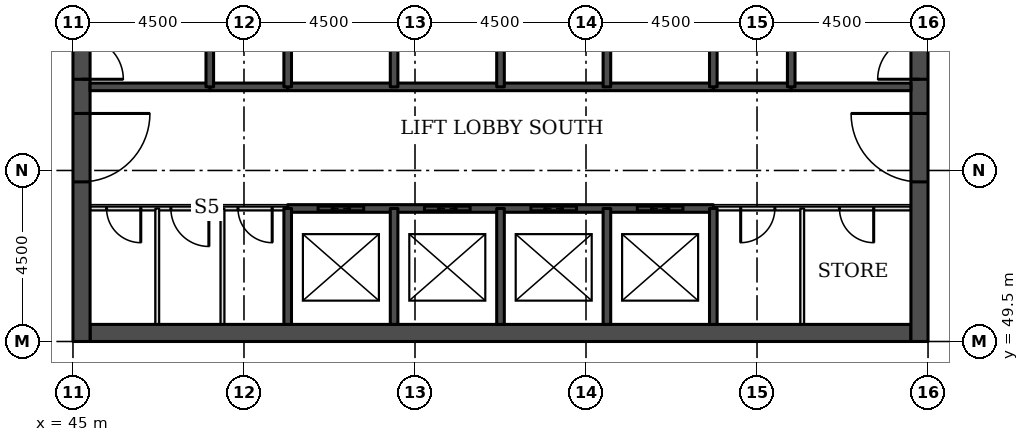
"""IFC4 building model, lengths in metres.
Left out: names, types, materials, properties, quantities, classifications, styles, units other than length and angle.
Written with IfcOpenShell. Run it as: python <this file> out.ifc"""

import sys

from ifc_helpers import new_model, si_unit, direction, frame, frame_2d, origin, place, context, subcontext, project, spatial, rectangle, extrude, element, fill, save


model = new_model("IFC4")
c1 = context("Model", 3, precision=1e-05, world=origin(), true_north=direction((0.0, 1.0)))
c2 = subcontext(c1, "Body", "Model", "MODEL_VIEW")
j1 = project(units=[si_unit("LENGTHUNIT", "METRE"), si_unit("PLANEANGLEUNIT", "RADIAN")], contexts=[c1])
p1 = place(None, origin())
s1 = spatial("IfcSite", under=j1, at=p1, CompositionType="ELEMENT")
p2 = place(p1, origin())
s2 = spatial("IfcBuilding", under=s1, at=p2, CompositionType="ELEMENT")
p3 = place(p2, frame((0.0, 0.0, 119.6)))
s3 = spatial("IfcBuildingStorey", under=s2, at=p3, CompositionType="ELEMENT", Elevation=119.6)
p4 = place(p3, frame((45.45, 49.725, 0.0), z_axis=(0.0, 0.0, 1.0), x_axis=(1.0, 0.0, 0.0)))
e1 = element("IfcWall", 1, at=p4, inside=s3, PredefinedType="SHEAR", context=c2, shape_type="SweptSolid", body=[
    extrude(rectangle(XDim=21.6, YDim=0.45, at=frame_2d((10.8, 0.0))), origin(), (0.0, 0.0, 1.0), 3.7),
])
p5 = place(p3, frame((45.225, 49.5, 0.0), z_axis=(0.0, 0.0, 1.0), x_axis=(0.0, 1.0, 0.0)))
e2 = element("IfcWall", 2, at=p5, inside=s3, PredefinedType="SHEAR", context=c2, shape_type="SweptSolid", body=[
    extrude(rectangle(XDim=22.5, YDim=0.45, at=frame_2d((11.25, 0.0))), origin(), (0.0, 0.0, 1.0), 3.7),
])
p6 = place(p5, frame((4.2, 0.0, 0.0)))
e3 = element("IfcOpeningElement", 3, at=p6, cuts=e2, PredefinedType="OPENING", context=c2, shape_type="SweptSolid", body=[
    extrude(rectangle(XDim=1.8, YDim=2.1, at=frame_2d((0.9, 1.05))), frame((0.0, 0.235, 0.0), z_axis=(0.0, -1.0, 0.0), x_axis=(1.0, 0.0, 0.0)), (0.0, 0.0, 1.0), 0.47),
])
p7 = place(p5, frame((6.9, 0.0, 0.0)))
e4 = element("IfcOpeningElement", 4, at=p7, cuts=e2, PredefinedType="OPENING", context=c2, shape_type="SweptSolid", body=[
    extrude(rectangle(XDim=1.1, YDim=2.1, at=frame_2d((0.55, 1.05))), frame((0.0, 0.235, 0.0), z_axis=(0.0, -1.0, 0.0), x_axis=(1.0, 0.0, 0.0)), (0.0, 0.0, 1.0), 0.47),
])
p8 = place(p5, frame((13.6, 0.0, 0.0)))
e5 = element("IfcOpeningElement", 5, at=p8, cuts=e2, PredefinedType="OPENING", context=c2, shape_type="SweptSolid", body=[
    extrude(rectangle(XDim=1.1, YDim=2.1, at=frame_2d((0.55, 1.05))), frame((0.0, 0.235, 0.0), z_axis=(0.0, -1.0, 0.0), x_axis=(1.0, 0.0, 0.0)), (0.0, 0.0, 1.0), 0.47),
])
p9 = place(p5, frame((16.5, 0.0, 0.0)))
e6 = element("IfcOpeningElement", 6, at=p9, cuts=e2, PredefinedType="OPENING", context=c2, shape_type="SweptSolid", body=[
    extrude(rectangle(XDim=1.8, YDim=2.1, at=frame_2d((0.9, 1.05))), frame((0.0, 0.235, 0.0), z_axis=(0.0, -1.0, 0.0), x_axis=(1.0, 0.0, 0.0)), (0.0, 0.0, 1.0), 0.47),
])
p10 = place(p3, frame((67.275, 49.5, 0.0), z_axis=(0.0, 0.0, 1.0), x_axis=(0.0, 1.0, 0.0)))
e7 = element("IfcWall", 7, at=p10, inside=s3, PredefinedType="SHEAR", context=c2, shape_type="SweptSolid", body=[
    extrude(rectangle(XDim=22.5, YDim=0.45, at=frame_2d((11.25, 0.0))), origin(), (0.0, 0.0, 1.0), 3.7),
])
p11 = place(p10, frame((4.2, 0.0, 0.0)))
e8 = element("IfcOpeningElement", 8, at=p11, cuts=e7, PredefinedType="OPENING", context=c2, shape_type="SweptSolid", body=[
    extrude(rectangle(XDim=1.8, YDim=2.1, at=frame_2d((0.9, 1.05))), frame((0.0, 0.235, 0.0), z_axis=(0.0, -1.0, 0.0), x_axis=(1.0, 0.0, 0.0)), (0.0, 0.0, 1.0), 0.47),
])
p12 = place(p10, frame((6.9, 0.0, 0.0)))
e9 = element("IfcOpeningElement", 9, at=p12, cuts=e7, PredefinedType="OPENING", context=c2, shape_type="SweptSolid", body=[
    extrude(rectangle(XDim=1.1, YDim=2.1, at=frame_2d((0.55, 1.05))), frame((0.0, 0.235, 0.0), z_axis=(0.0, -1.0, 0.0), x_axis=(1.0, 0.0, 0.0)), (0.0, 0.0, 1.0), 0.47),
])
p13 = place(p10, frame((13.6, 0.0, 0.0)))
e10 = element("IfcOpeningElement", 10, at=p13, cuts=e7, PredefinedType="OPENING", context=c2, shape_type="SweptSolid", body=[
    extrude(rectangle(XDim=1.1, YDim=2.1, at=frame_2d((0.55, 1.05))), frame((0.0, 0.235, 0.0), z_axis=(0.0, -1.0, 0.0), x_axis=(1.0, 0.0, 0.0)), (0.0, 0.0, 1.0), 0.47),
])
p14 = place(p10, frame((16.5, 0.0, 0.0)))
e11 = element("IfcOpeningElement", 11, at=p14, cuts=e7, PredefinedType="OPENING", context=c2, shape_type="SweptSolid", body=[
    extrude(rectangle(XDim=1.8, YDim=2.1, at=frame_2d((0.9, 1.05))), frame((0.0, 0.235, 0.0), z_axis=(0.0, -1.0, 0.0), x_axis=(1.0, 0.0, 0.0)), (0.0, 0.0, 1.0), 0.47),
])
p15 = place(p3, frame((45.45, 53.0, 0.0), z_axis=(0.0, 0.0, 1.0), x_axis=(1.0, 0.0, 0.0)))
e12 = element("IfcWall", 12, at=p15, inside=s3, PredefinedType="PARTITIONING", context=c2, shape_type="SweptSolid", body=[
    extrude(rectangle(XDim=5.2, YDim=0.1, at=frame_2d((2.6, 0.0))), origin(), (0.0, 0.0, 1.0), 3.55),
])
p16 = place(p15, frame((0.434, 0.0, 0.0)))
e13 = element("IfcOpeningElement", 13, at=p16, cuts=e12, PredefinedType="OPENING", context=c2, shape_type="SweptSolid", body=[
    extrude(rectangle(XDim=0.9, YDim=2.1, at=frame_2d((0.45, 1.05))), frame((0.0, 0.06, 0.0), z_axis=(0.0, -1.0, 0.0), x_axis=(1.0, 0.0, 0.0)), (0.0, 0.0, 1.0), 0.12),
])
p17 = place(p15, frame((2.126, 0.0, 0.0)))
e14 = element("IfcOpeningElement", 14, at=p17, cuts=e12, PredefinedType="OPENING", context=c2, shape_type="SweptSolid", body=[
    extrude(rectangle(XDim=1.0, YDim=2.1, at=frame_2d((0.5, 1.05))), frame((0.0, 0.06, 0.0), z_axis=(0.0, -1.0, 0.0), x_axis=(1.0, 0.0, 0.0)), (0.0, 0.0, 1.0), 0.12),
])
p18 = place(p15, frame((3.892, 0.0, 0.0)))
e15 = element("IfcOpeningElement", 15, at=p18, cuts=e12, PredefinedType="OPENING", context=c2, shape_type="SweptSolid", body=[
    extrude(rectangle(XDim=0.9, YDim=2.1, at=frame_2d((0.45, 1.05))), frame((0.0, 0.06, 0.0), z_axis=(0.0, -1.0, 0.0), x_axis=(1.0, 0.0, 0.0)), (0.0, 0.0, 1.0), 0.12),
])
p19 = place(p3, frame((61.85, 53.0, 0.0), z_axis=(0.0, 0.0, 1.0), x_axis=(1.0, 0.0, 0.0)))
e16 = element("IfcWall", 16, at=p19, inside=s3, PredefinedType="PARTITIONING", context=c2, shape_type="SweptSolid", body=[
    extrude(rectangle(XDim=5.2, YDim=0.1, at=frame_2d((2.6, 0.0))), origin(), (0.0, 0.0, 1.0), 3.55),
])
p20 = place(p19, frame((3.32, 0.0, 0.0)))
e17 = element("IfcOpeningElement", 17, at=p20, cuts=e16, PredefinedType="OPENING", context=c2, shape_type="SweptSolid", body=[
    extrude(rectangle(XDim=0.9, YDim=2.1, at=frame_2d((0.45, 1.05))), frame((0.0, 0.06, 0.0), z_axis=(0.0, -1.0, 0.0), x_axis=(1.0, 0.0, 0.0)), (0.0, 0.0, 1.0), 0.12),
])
p21 = place(p19, frame((0.72, 0.0, 0.0)))
e18 = element("IfcOpeningElement", 18, at=p21, cuts=e16, PredefinedType="OPENING", context=c2, shape_type="SweptSolid", body=[
    extrude(rectangle(XDim=0.9, YDim=2.1, at=frame_2d((0.45, 1.05))), frame((0.0, 0.06, 0.0), z_axis=(0.0, -1.0, 0.0), x_axis=(1.0, 0.0, 0.0)), (0.0, 0.0, 1.0), 0.12),
])
p22 = place(p3, frame((50.65, 53.0, 0.0), z_axis=(0.0, 0.0, 1.0), x_axis=(1.0, 0.0, 0.0)))
e19 = element("IfcWall", 19, at=p22, inside=s3, PredefinedType="SOLIDWALL", context=c2, shape_type="SweptSolid", body=[
    extrude(rectangle(XDim=11.2, YDim=0.2, at=frame_2d((5.6, 0.0))), origin(), (0.0, 0.0, 1.0), 3.55),
])
p23 = place(p22, frame((0.8, 0.0, 0.0)))
e20 = element("IfcOpeningElement", 20, at=p23, cuts=e19, PredefinedType="OPENING", context=c2, shape_type="SweptSolid", body=[
    extrude(rectangle(XDim=1.2, YDim=2.1, at=frame_2d((0.6, 1.05))), frame((0.0, 0.11, 0.0), z_axis=(0.0, -1.0, 0.0), x_axis=(1.0, 0.0, 0.0)), (0.0, 0.0, 1.0), 0.22),
])
p24 = place(p22, frame((3.6, 0.0, 0.0)))
e21 = element("IfcOpeningElement", 21, at=p24, cuts=e19, PredefinedType="OPENING", context=c2, shape_type="SweptSolid", body=[
    extrude(rectangle(XDim=1.2, YDim=2.1, at=frame_2d((0.6, 1.05))), frame((0.0, 0.11, 0.0), z_axis=(0.0, -1.0, 0.0), x_axis=(1.0, 0.0, 0.0)), (0.0, 0.0, 1.0), 0.22),
])
p25 = place(p22, frame((6.4, 0.0, 0.0)))
e22 = element("IfcOpeningElement", 22, at=p25, cuts=e19, PredefinedType="OPENING", context=c2, shape_type="SweptSolid", body=[
    extrude(rectangle(XDim=1.2, YDim=2.1, at=frame_2d((0.6, 1.05))), frame((0.0, 0.11, 0.0), z_axis=(0.0, -1.0, 0.0), x_axis=(1.0, 0.0, 0.0)), (0.0, 0.0, 1.0), 0.22),
])
p26 = place(p22, frame((9.2, 0.0, 0.0)))
e23 = element("IfcOpeningElement", 23, at=p26, cuts=e19, PredefinedType="OPENING", context=c2, shape_type="SweptSolid", body=[
    extrude(rectangle(XDim=1.2, YDim=2.1, at=frame_2d((0.6, 1.05))), frame((0.0, 0.11, 0.0), z_axis=(0.0, -1.0, 0.0), x_axis=(1.0, 0.0, 0.0)), (0.0, 0.0, 1.0), 0.22),
])
for number, where, z_axis, x_axis in (
    (24, (48.6, 56.2, 0.0), (0.0, 0.0, 1.0), (1.0, 0.0, 0.0)),
    (25, (61.85, 56.2, 0.0), (0.0, 0.0, 1.0), (1.0, 0.0, 0.0)),
):
    element("IfcWall", number, at=place(p3, frame(where, z_axis=z_axis, x_axis=x_axis)), inside=s3, PredefinedType="SOLIDWALL", context=c2, shape_type="SweptSolid", body=[
        extrude(rectangle(XDim=2.05, YDim=0.2, at=frame_2d((1.025, 0.0))), origin(), (0.0, 0.0, 1.0), 3.55),
    ])
p27 = place(p3, frame((45.45, 56.2, 0.0), z_axis=(0.0, 0.0, 1.0), x_axis=(1.0, 0.0, 0.0)))
e26 = element("IfcWall", 26, at=p27, inside=s3, PredefinedType="SOLIDWALL", context=c2, shape_type="SweptSolid", body=[
    extrude(rectangle(XDim=3.15, YDim=0.2, at=frame_2d((1.575, 0.0))), origin(), (0.0, 0.0, 1.0), 3.55),
])
p28 = place(p3, frame((50.65, 56.2, 0.0), z_axis=(0.0, 0.0, 1.0), x_axis=(1.0, 0.0, 0.0)))
e27 = element("IfcWall", 27, at=p28, inside=s3, PredefinedType="SOLIDWALL", context=c2, shape_type="SweptSolid", body=[
    extrude(rectangle(XDim=11.2, YDim=0.2, at=frame_2d((5.6, 0.0))), origin(), (0.0, 0.0, 1.0), 3.55),
])
p29 = place(p3, frame((63.9, 56.2, 0.0), z_axis=(0.0, 0.0, 1.0), x_axis=(1.0, 0.0, 0.0)))
e28 = element("IfcWall", 28, at=p29, inside=s3, PredefinedType="SOLIDWALL", context=c2, shape_type="SweptSolid", body=[
    extrude(rectangle(XDim=3.15, YDim=0.2, at=frame_2d((1.575, 0.0))), origin(), (0.0, 0.0, 1.0), 3.55),
])
p30 = place(p3, frame((47.218, 49.95, 0.0), z_axis=(0.0, 0.0, 1.0), x_axis=(0.0, 1.0, 0.0)))
e29 = element("IfcWall", 29, at=p30, inside=s3, PredefinedType="PARTITIONING", context=c2, shape_type="SweptSolid", body=[
    extrude(rectangle(XDim=3.05, YDim=0.1, at=frame_2d((1.525, 0.0))), origin(), (0.0, 0.0, 1.0), 3.55),
])
p31 = place(p3, frame((48.6, 56.2, 0.0), z_axis=(0.0, 0.0, 1.0), x_axis=(0.0, 1.0, 0.0)))
e30 = element("IfcWall", 30, at=p31, inside=s3, PredefinedType="SOLIDWALL", context=c2, shape_type="SweptSolid", body=[
    extrude(rectangle(XDim=5.8, YDim=0.2, at=frame_2d((2.9, 0.0))), origin(), (0.0, 0.0, 1.0), 3.55),
])
p32 = place(p3, frame((48.934, 49.95, 0.0), z_axis=(0.0, 0.0, 1.0), x_axis=(0.0, 1.0, 0.0)))
e31 = element("IfcWall", 31, at=p32, inside=s3, PredefinedType="PARTITIONING", context=c2, shape_type="SweptSolid", body=[
    extrude(rectangle(XDim=3.05, YDim=0.1, at=frame_2d((1.525, 0.0))), origin(), (0.0, 0.0, 1.0), 3.55),
])
p33 = place(p3, frame((50.65, 49.95, 0.0), z_axis=(0.0, 0.0, 1.0), x_axis=(0.0, 1.0, 0.0)))
e32 = element("IfcWall", 32, at=p33, inside=s3, PredefinedType="SOLIDWALL", context=c2, shape_type="SweptSolid", body=[
    extrude(rectangle(XDim=3.05, YDim=0.2, at=frame_2d((1.525, 0.0))), origin(), (0.0, 0.0, 1.0), 3.55),
])
p34 = place(p3, frame((50.65, 56.2, 0.0), z_axis=(0.0, 0.0, 1.0), x_axis=(0.0, 1.0, 0.0)))
e33 = element("IfcWall", 33, at=p34, inside=s3, PredefinedType="SOLIDWALL", context=c2, shape_type="SweptSolid", body=[
    extrude(rectangle(XDim=2.8, YDim=0.2, at=frame_2d((1.4, 0.0))), origin(), (0.0, 0.0, 1.0), 3.55),
])
p35 = place(p3, frame((53.45, 49.95, 0.0), z_axis=(0.0, 0.0, 1.0), x_axis=(0.0, 1.0, 0.0)))
e34 = element("IfcWall", 34, at=p35, inside=s3, PredefinedType="SOLIDWALL", context=c2, shape_type="SweptSolid", body=[
    extrude(rectangle(XDim=3.05, YDim=0.2, at=frame_2d((1.525, 0.0))), origin(), (0.0, 0.0, 1.0), 3.55),
])
p36 = place(p3, frame((53.45, 56.2, 0.0), z_axis=(0.0, 0.0, 1.0), x_axis=(0.0, 1.0, 0.0)))
e35 = element("IfcWall", 35, at=p36, inside=s3, PredefinedType="SOLIDWALL", context=c2, shape_type="SweptSolid", body=[
    extrude(rectangle(XDim=2.8, YDim=0.2, at=frame_2d((1.4, 0.0))), origin(), (0.0, 0.0, 1.0), 3.55),
])
p37 = place(p3, frame((56.25, 49.95, 0.0), z_axis=(0.0, 0.0, 1.0), x_axis=(0.0, 1.0, 0.0)))
e36 = element("IfcWall", 36, at=p37, inside=s3, PredefinedType="SOLIDWALL", context=c2, shape_type="SweptSolid", body=[
    extrude(rectangle(XDim=3.05, YDim=0.2, at=frame_2d((1.525, 0.0))), origin(), (0.0, 0.0, 1.0), 3.55),
])
p38 = place(p3, frame((56.25, 56.2, 0.0), z_axis=(0.0, 0.0, 1.0), x_axis=(0.0, 1.0, 0.0)))
e37 = element("IfcWall", 37, at=p38, inside=s3, PredefinedType="SOLIDWALL", context=c2, shape_type="SweptSolid", body=[
    extrude(rectangle(XDim=2.8, YDim=0.2, at=frame_2d((1.4, 0.0))), origin(), (0.0, 0.0, 1.0), 3.55),
])
p39 = place(p3, frame((59.05, 49.95, 0.0), z_axis=(0.0, 0.0, 1.0), x_axis=(0.0, 1.0, 0.0)))
e38 = element("IfcWall", 38, at=p39, inside=s3, PredefinedType="SOLIDWALL", context=c2, shape_type="SweptSolid", body=[
    extrude(rectangle(XDim=3.05, YDim=0.2, at=frame_2d((1.525, 0.0))), origin(), (0.0, 0.0, 1.0), 3.55),
])
p40 = place(p3, frame((59.05, 56.2, 0.0), z_axis=(0.0, 0.0, 1.0), x_axis=(0.0, 1.0, 0.0)))
e39 = element("IfcWall", 39, at=p40, inside=s3, PredefinedType="SOLIDWALL", context=c2, shape_type="SweptSolid", body=[
    extrude(rectangle(XDim=2.8, YDim=0.2, at=frame_2d((1.4, 0.0))), origin(), (0.0, 0.0, 1.0), 3.55),
])
p41 = place(p3, frame((61.85, 49.95, 0.0), z_axis=(0.0, 0.0, 1.0), x_axis=(0.0, 1.0, 0.0)))
e40 = element("IfcWall", 40, at=p41, inside=s3, PredefinedType="SOLIDWALL", context=c2, shape_type="SweptSolid", body=[
    extrude(rectangle(XDim=3.05, YDim=0.2, at=frame_2d((1.525, 0.0))), origin(), (0.0, 0.0, 1.0), 3.55),
])
p42 = place(p3, frame((61.85, 56.2, 0.0), z_axis=(0.0, 0.0, 1.0), x_axis=(0.0, 1.0, 0.0)))
e41 = element("IfcWall", 41, at=p42, inside=s3, PredefinedType="SOLIDWALL", context=c2, shape_type="SweptSolid", body=[
    extrude(rectangle(XDim=2.8, YDim=0.2, at=frame_2d((1.4, 0.0))), origin(), (0.0, 0.0, 1.0), 3.55),
])
p43 = place(p3, frame((63.9, 56.2, 0.0), z_axis=(0.0, 0.0, 1.0), x_axis=(0.0, 1.0, 0.0)))
e42 = element("IfcWall", 42, at=p43, inside=s3, PredefinedType="SOLIDWALL", context=c2, shape_type="SweptSolid", body=[
    extrude(rectangle(XDim=5.8, YDim=0.2, at=frame_2d((2.9, 0.0))), origin(), (0.0, 0.0, 1.0), 3.55),
])
p44 = place(p3, frame((64.19, 49.95, 0.0), z_axis=(0.0, 0.0, 1.0), x_axis=(0.0, 1.0, 0.0)))
e43 = element("IfcWall", 43, at=p44, inside=s3, PredefinedType="PARTITIONING", context=c2, shape_type="SweptSolid", body=[
    extrude(rectangle(XDim=3.05, YDim=0.1, at=frame_2d((1.525, 0.0))), origin(), (0.0, 0.0, 1.0), 3.55),
])
p45 = place(p23, origin())
e44 = element("IfcDoor", 44, at=p45, inside=s3, OperationType="DOUBLE_DOOR_SLIDING", PredefinedType="DOOR", context=c2, shape_type="SweptSolid", body=[
    extrude(rectangle(XDim=1.2, YDim=2.1, at=frame_2d((0.6, 1.05))), frame((0.0, 0.025, 0.0), z_axis=(0.0, -1.0, 0.0), x_axis=(1.0, 0.0, 0.0)), (0.0, 0.0, 1.0), 0.05),
])
fill(e20, e44)
p46 = place(p24, origin())
e45 = element("IfcDoor", 45, at=p46, inside=s3, OperationType="DOUBLE_DOOR_SLIDING", PredefinedType="DOOR", context=c2, shape_type="SweptSolid", body=[
    extrude(rectangle(XDim=1.2, YDim=2.1, at=frame_2d((0.6, 1.05))), frame((0.0, 0.025, 0.0), z_axis=(0.0, -1.0, 0.0), x_axis=(1.0, 0.0, 0.0)), (0.0, 0.0, 1.0), 0.05),
])
fill(e21, e45)
p47 = place(p25, origin())
e46 = element("IfcDoor", 46, at=p47, inside=s3, OperationType="DOUBLE_DOOR_SLIDING", PredefinedType="DOOR", context=c2, shape_type="SweptSolid", body=[
    extrude(rectangle(XDim=1.2, YDim=2.1, at=frame_2d((0.6, 1.05))), frame((0.0, 0.025, 0.0), z_axis=(0.0, -1.0, 0.0), x_axis=(1.0, 0.0, 0.0)), (0.0, 0.0, 1.0), 0.05),
])
fill(e22, e46)
p48 = place(p26, origin())
e47 = element("IfcDoor", 47, at=p48, inside=s3, OperationType="DOUBLE_DOOR_SLIDING", PredefinedType="DOOR", context=c2, shape_type="SweptSolid", body=[
    extrude(rectangle(XDim=1.2, YDim=2.1, at=frame_2d((0.6, 1.05))), frame((0.0, 0.025, 0.0), z_axis=(0.0, -1.0, 0.0), x_axis=(1.0, 0.0, 0.0)), (0.0, 0.0, 1.0), 0.05),
])
fill(e23, e47)
p49 = place(p6, frame((1.8, 0.0, 0.0), z_axis=(0.0, 0.0, 1.0), x_axis=(-1.0, 0.0, 0.0)))
e48 = element("IfcDoor", 48, at=p49, inside=s3, OperationType="SINGLE_SWING_LEFT", PredefinedType="DOOR", context=c2, shape_type="SweptSolid", body=[
    extrude(rectangle(XDim=1.8, YDim=2.1, at=frame_2d((0.9, 1.05))), frame((0.0, 0.025, 0.0), z_axis=(0.0, -1.0, 0.0), x_axis=(1.0, 0.0, 0.0)), (0.0, 0.0, 1.0), 0.05),
])
fill(e3, e48)
p50 = place(p7, frame((1.1, 0.0, 0.0), z_axis=(0.0, 0.0, 1.0), x_axis=(-1.0, 0.0, 0.0)))
e49 = element("IfcDoor", 49, at=p50, inside=s3, OperationType="SINGLE_SWING_RIGHT", PredefinedType="DOOR", context=c2, shape_type="SweptSolid", body=[
    extrude(rectangle(XDim=1.1, YDim=2.1, at=frame_2d((0.55, 1.05))), frame((0.0, 0.025, 0.0), z_axis=(0.0, -1.0, 0.0), x_axis=(1.0, 0.0, 0.0)), (0.0, 0.0, 1.0), 0.05),
])
fill(e4, e49)
p51 = place(p11, origin())
e50 = element("IfcDoor", 50, at=p51, inside=s3, OperationType="SINGLE_SWING_RIGHT", PredefinedType="DOOR", context=c2, shape_type="SweptSolid", body=[
    extrude(rectangle(XDim=1.8, YDim=2.1, at=frame_2d((0.9, 1.05))), frame((0.0, 0.025, 0.0), z_axis=(0.0, -1.0, 0.0), x_axis=(1.0, 0.0, 0.0)), (0.0, 0.0, 1.0), 0.05),
])
fill(e8, e50)
p52 = place(p12, origin())
e51 = element("IfcDoor", 51, at=p52, inside=s3, OperationType="SINGLE_SWING_LEFT", PredefinedType="DOOR", context=c2, shape_type="SweptSolid", body=[
    extrude(rectangle(XDim=1.1, YDim=2.1, at=frame_2d((0.55, 1.05))), frame((0.0, 0.025, 0.0), z_axis=(0.0, -1.0, 0.0), x_axis=(1.0, 0.0, 0.0)), (0.0, 0.0, 1.0), 0.05),
])
fill(e9, e51)
p53 = place(p20, frame((0.9, 0.0, 0.0), z_axis=(0.0, 0.0, 1.0), x_axis=(-1.0, 0.0, 0.0)))
e52 = element("IfcDoor", 52, at=p53, inside=s3, OperationType="SINGLE_SWING_LEFT", PredefinedType="DOOR", context=c2, shape_type="SweptSolid", body=[
    extrude(rectangle(XDim=0.9, YDim=2.1, at=frame_2d((0.45, 1.05))), frame((0.0, 0.025, 0.0), z_axis=(0.0, -1.0, 0.0), x_axis=(1.0, 0.0, 0.0)), (0.0, 0.0, 1.0), 0.05),
])
fill(e17, e52)
p54 = place(p21, frame((0.9, 0.0, 0.0), z_axis=(0.0, 0.0, 1.0), x_axis=(-1.0, 0.0, 0.0)))
e53 = element("IfcDoor", 53, at=p54, inside=s3, OperationType="SINGLE_SWING_RIGHT", PredefinedType="DOOR", context=c2, shape_type="SweptSolid", body=[
    extrude(rectangle(XDim=0.9, YDim=2.1, at=frame_2d((0.45, 1.05))), frame((0.0, 0.025, 0.0), z_axis=(0.0, -1.0, 0.0), x_axis=(1.0, 0.0, 0.0)), (0.0, 0.0, 1.0), 0.05),
])
fill(e18, e53)
p55 = place(p16, frame((0.9, 0.0, 0.0), z_axis=(0.0, 0.0, 1.0), x_axis=(-1.0, 0.0, 0.0)))
e54 = element("IfcDoor", 54, at=p55, inside=s3, OperationType="SINGLE_SWING_LEFT", PredefinedType="DOOR", context=c2, shape_type="SweptSolid", body=[
    extrude(rectangle(XDim=0.9, YDim=2.1, at=frame_2d((0.45, 1.05))), frame((0.0, 0.025, 0.0), z_axis=(0.0, -1.0, 0.0), x_axis=(1.0, 0.0, 0.0)), (0.0, 0.0, 1.0), 0.05),
])
fill(e13, e54)
p56 = place(p17, frame((1.0, 0.0, 0.0), z_axis=(0.0, 0.0, 1.0), x_axis=(-1.0, 0.0, 0.0)))
e55 = element("IfcDoor", 55, at=p56, inside=s3, OperationType="SINGLE_SWING_LEFT", PredefinedType="DOOR", context=c2, shape_type="SweptSolid", body=[
    extrude(rectangle(XDim=1.0, YDim=2.1, at=frame_2d((0.5, 1.05))), frame((0.0, 0.025, 0.0), z_axis=(0.0, -1.0, 0.0), x_axis=(1.0, 0.0, 0.0)), (0.0, 0.0, 1.0), 0.05),
])
fill(e14, e55)
p57 = place(p18, frame((0.9, 0.0, 0.0), z_axis=(0.0, 0.0, 1.0), x_axis=(-1.0, 0.0, 0.0)))
e56 = element("IfcDoor", 56, at=p57, inside=s3, OperationType="SINGLE_SWING_LEFT", PredefinedType="DOOR", context=c2, shape_type="SweptSolid", body=[
    extrude(rectangle(XDim=0.9, YDim=2.1, at=frame_2d((0.45, 1.05))), frame((0.0, 0.025, 0.0), z_axis=(0.0, -1.0, 0.0), x_axis=(1.0, 0.0, 0.0)), (0.0, 0.0, 1.0), 0.05),
])
fill(e15, e56)
save(model, sys.argv[1])
